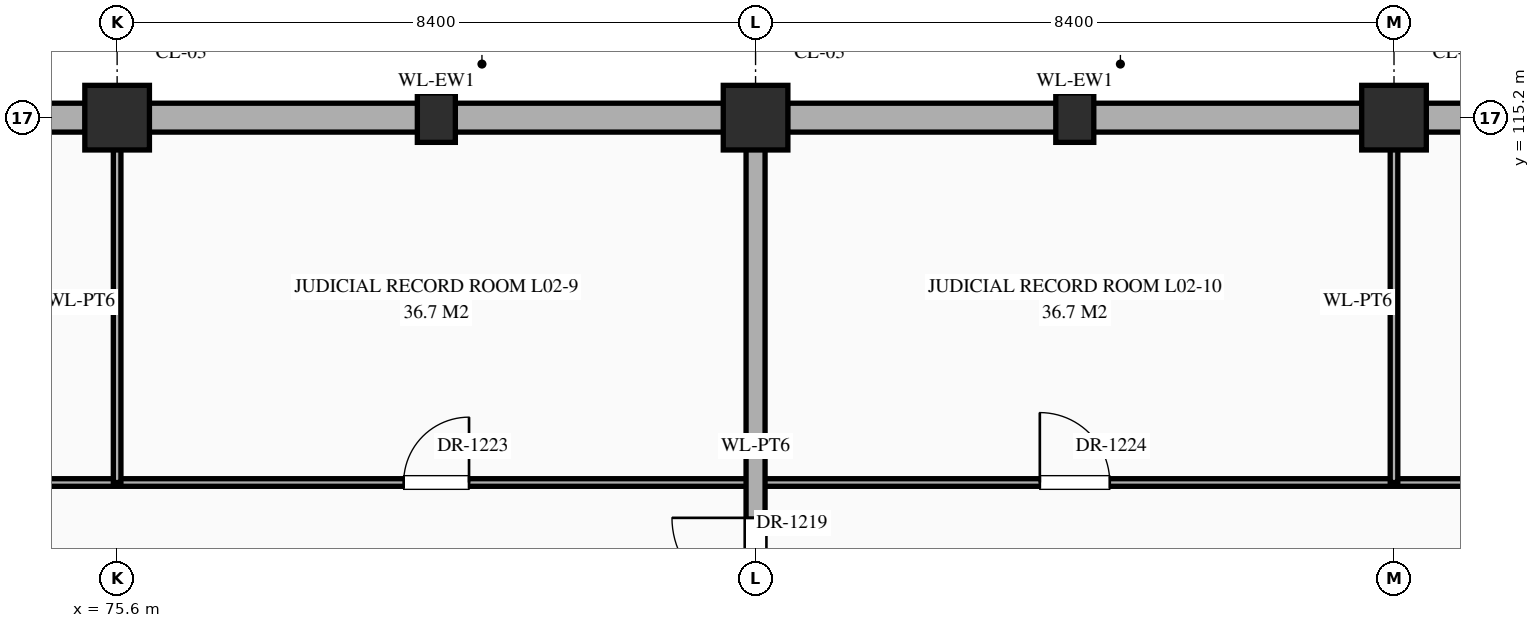
"""IFC4 building model, lengths in metres.
Left out: names, types, materials, properties, quantities, classifications, styles, units other than length and angle.
Written with IfcOpenShell. Run it as: python <this file> out.ifc"""

import sys

from ifc_helpers import new_model, si_unit, direction, frame, frame_2d, origin, origin_2d, place, context, subcontext, project, spatial, rectangle, extrude, element, fill, save


model = new_model("IFC4")
c1 = context("Model", 3, precision=1e-05, world=origin(), true_north=direction((0.0, 1.0)))
c2 = subcontext(c1, "Body", "Model", "MODEL_VIEW")
j1 = project(units=[si_unit("LENGTHUNIT", "METRE"), si_unit("PLANEANGLEUNIT", "RADIAN")], contexts=[c1])
p1 = place(None, origin())
s1 = spatial("IfcSite", under=j1, at=p1, CompositionType="ELEMENT")
p2 = place(p1, origin())
s2 = spatial("IfcBuilding", under=s1, at=p2, CompositionType="ELEMENT")
p3 = place(p2, frame((0.0, 0.0, 5.4)))
s3 = spatial("IfcBuildingStorey", under=s2, at=p3, CompositionType="ELEMENT", Elevation=5.4)
for number, where, z_axis, x_axis in (
    (1, (75.6, 115.2, 0.0), (0.0, 0.0, 1.0), (1.0, 0.0, 0.0)),
    (2, (84.0, 115.2, 0.0), (0.0, 0.0, 1.0), (1.0, 0.0, 0.0)),
    (3, (92.4, 115.2, 0.0), (0.0, 0.0, 1.0), (1.0, 0.0, 0.0)),
):
    element("IfcColumn", number, at=place(p3, frame(where, z_axis=z_axis, x_axis=x_axis)), inside=s3, PredefinedType="COLUMN", context=c2, shape_type="SweptSolid", body=[
        extrude(rectangle(XDim=0.85, YDim=0.85, at=origin_2d()), origin(), (0.0, 0.0, 1.0), 5.4),
    ])
for number, where, z_axis, x_axis in (
    (4, (79.8, 115.2, 0.0), (0.0, 0.0, 1.0), (1.0, 0.0, 0.0)),
    (5, (88.2, 115.2, 0.0), (0.0, 0.0, 1.0), (1.0, 0.0, 0.0)),
):
    element("IfcColumn", number, at=place(p3, frame(where, z_axis=z_axis, x_axis=x_axis)), inside=s3, PredefinedType="PILASTER", context=c2, shape_type="SweptSolid", body=[
        extrude(rectangle(XDim=0.5, YDim=0.65, at=origin_2d()), origin(), (0.0, 0.0, 1.0), 5.4),
    ])
p4 = place(p3, frame((67.62, 115.2, 0.0), z_axis=(0.0, 0.0, 1.0), x_axis=(1.0, 0.0, 0.0)))
e6 = element("IfcWall", 6, at=p4, inside=s3, PredefinedType="STANDARD", context=c2, shape_type="SweptSolid", body=[
    extrude(rectangle(XDim=7.56, YDim=0.38, at=frame_2d((3.78, 0.0))), origin(), (0.0, 0.0, 1.0), 4.47),
])
for number, where, z_axis, x_axis in (
    (7, (76.02, 115.2, 0.0), (0.0, 0.0, 1.0), (1.0, 0.0, 0.0)),
    (8, (84.42, 115.2, 0.0), (0.0, 0.0, 1.0), (1.0, 0.0, 0.0)),
):
    element("IfcWall", number, at=place(p3, frame(where, z_axis=z_axis, x_axis=x_axis)), inside=s3, PredefinedType="STANDARD", context=c2, shape_type="SweptSolid", body=[
        extrude(rectangle(XDim=7.56, YDim=0.38, at=frame_2d((3.78, 0.0))), origin(), (0.0, 0.0, 1.0), 4.47),
    ])
p5 = place(p3, frame((92.82, 115.2, 0.0), z_axis=(0.0, 0.0, 1.0), x_axis=(1.0, 0.0, 0.0)))
e9 = element("IfcWall", 9, at=p5, inside=s3, PredefinedType="STANDARD", context=c2, shape_type="SweptSolid", body=[
    extrude(rectangle(XDim=7.56, YDim=0.38, at=frame_2d((3.78, 0.0))), origin(), (0.0, 0.0, 1.0), 4.47),
])
p6 = place(p3, frame((50.44, 110.4, 0.0), z_axis=(0.0, 0.0, 1.0), x_axis=(1.0, 0.0, 0.0)))
e10 = element("IfcWall", 10, at=p6, inside=s3, PredefinedType="STANDARD", context=c2, shape_type="SweptSolid", body=[
    extrude(rectangle(XDim=67.12, YDim=0.1, at=frame_2d((33.56, 0.0))), origin(), (0.0, 0.0, 1.0), 5.12),
])
p7 = place(p6, frame((3.65, 0.0, 0.0)))
e11 = element("IfcOpeningElement", 11, at=p7, cuts=e10, PredefinedType="OPENING", context=c2, shape_type="SweptSolid", body=[
    extrude(rectangle(XDim=1.06, YDim=2.4, at=frame_2d((0.53, 1.2))), frame((0.0, 0.062, 0.0), z_axis=(0.0, -1.0, 0.0), x_axis=(1.0, 0.0, 0.0)), (0.0, 0.0, 1.0), 0.124),
])
p8 = place(p6, frame((11.99, 0.0, 0.0)))
e12 = element("IfcOpeningElement", 12, at=p8, cuts=e10, PredefinedType="OPENING", context=c2, shape_type="SweptSolid", body=[
    extrude(rectangle(XDim=1.14, YDim=2.4, at=frame_2d((0.57, 1.2))), frame((0.0, 0.062, 0.0), z_axis=(0.0, -1.0, 0.0), x_axis=(1.0, 0.0, 0.0)), (0.0, 0.0, 1.0), 0.124),
])
p9 = place(p6, frame((20.51, 0.0, 0.0)))
e13 = element("IfcOpeningElement", 13, at=p9, cuts=e10, PredefinedType="OPENING", context=c2, shape_type="SweptSolid", body=[
    extrude(rectangle(XDim=0.9, YDim=2.15, at=frame_2d((0.45, 1.075))), frame((0.0, 0.062, 0.0), z_axis=(0.0, -1.0, 0.0), x_axis=(1.0, 0.0, 0.0)), (0.0, 0.0, 1.0), 0.124),
])
p10 = place(p6, frame((28.93, 0.0, 0.0)))
e14 = element("IfcOpeningElement", 14, at=p10, cuts=e10, PredefinedType="OPENING", context=c2, shape_type="SweptSolid", body=[
    extrude(rectangle(XDim=0.86, YDim=2.1, at=frame_2d((0.43, 1.05))), frame((0.0, 0.062, 0.0), z_axis=(0.0, -1.0, 0.0), x_axis=(1.0, 0.0, 0.0)), (0.0, 0.0, 1.0), 0.124),
])
p11 = place(p6, frame((37.3, 0.0, 0.0)))
e15 = element("IfcOpeningElement", 15, at=p11, cuts=e10, PredefinedType="OPENING", context=c2, shape_type="SweptSolid", body=[
    extrude(rectangle(XDim=0.92, YDim=2.15, at=frame_2d((0.46, 1.075))), frame((0.0, 0.062, 0.0), z_axis=(0.0, -1.0, 0.0), x_axis=(1.0, 0.0, 0.0)), (0.0, 0.0, 1.0), 0.124),
])
p12 = place(p6, frame((45.68, 0.0, 0.0)))
e16 = element("IfcOpeningElement", 16, at=p12, cuts=e10, PredefinedType="OPENING", context=c2, shape_type="SweptSolid", body=[
    extrude(rectangle(XDim=0.96, YDim=2.2, at=frame_2d((0.48, 1.1))), frame((0.0, 0.062, 0.0), z_axis=(0.0, -1.0, 0.0), x_axis=(1.0, 0.0, 0.0)), (0.0, 0.0, 1.0), 0.124),
])
p13 = place(p6, frame((54.06, 0.0, 0.0)))
e17 = element("IfcOpeningElement", 17, at=p13, cuts=e10, PredefinedType="OPENING", context=c2, shape_type="SweptSolid", body=[
    extrude(rectangle(XDim=1.0, YDim=2.25, at=frame_2d((0.5, 1.125))), frame((0.0, 0.062, 0.0), z_axis=(0.0, -1.0, 0.0), x_axis=(1.0, 0.0, 0.0)), (0.0, 0.0, 1.0), 0.124),
])
p14 = place(p6, frame((62.42, 0.0, 0.0)))
e18 = element("IfcOpeningElement", 18, at=p14, cuts=e10, PredefinedType="OPENING", context=c2, shape_type="SweptSolid", body=[
    extrude(rectangle(XDim=1.04, YDim=2.2, at=frame_2d((0.52, 1.1))), frame((0.0, 0.062, 0.0), z_axis=(0.0, -1.0, 0.0), x_axis=(1.0, 0.0, 0.0)), (0.0, 0.0, 1.0), 0.124),
])
p15 = place(p3, frame((75.6, 110.4, 0.0), z_axis=(0.0, 0.0, 1.0), x_axis=(0.0, 1.0, 0.0)))
e19 = element("IfcWall", 19, at=p15, inside=s3, PredefinedType="STANDARD", context=c2, shape_type="SweptSolid", body=[
    extrude(rectangle(XDim=4.76, YDim=0.1, at=frame_2d((2.38, 0.0))), origin(), (0.0, 0.0, 1.0), 4.37),
])
p16 = place(p3, frame((84.0, 100.8, 0.0), z_axis=(0.0, 0.0, 1.0), x_axis=(0.0, 1.0, 0.0)))
e20 = element("IfcWall", 20, at=p16, inside=s3, PredefinedType="STANDARD", context=c2, shape_type="SweptSolid", body=[
    extrude(rectangle(XDim=14.36, YDim=0.25, at=frame_2d((7.18, 0.0))), origin(), (0.0, 0.0, 1.0), 4.37),
])
p17 = place(p16, frame((0.985, 0.0, 0.0)))
e21 = element("IfcOpeningElement", 21, at=p17, cuts=e20, PredefinedType="OPENING", context=c2, shape_type="SweptSolid", body=[
    extrude(rectangle(XDim=2.0, YDim=2.4, at=frame_2d((1.0, 1.2))), frame((0.0, 0.137, 0.0), z_axis=(0.0, -1.0, 0.0), x_axis=(1.0, 0.0, 0.0)), (0.0, 0.0, 1.0), 0.274),
])
p18 = place(p16, frame((4.465, 0.0, 0.0)))
e22 = element("IfcOpeningElement", 22, at=p18, cuts=e20, PredefinedType="OPENING", context=c2, shape_type="SweptSolid", body=[
    extrude(rectangle(XDim=1.5, YDim=2.25, at=frame_2d((0.75, 1.125))), frame((0.0, 0.137, 0.0), z_axis=(0.0, -1.0, 0.0), x_axis=(1.0, 0.0, 0.0)), (0.0, 0.0, 1.0), 0.274),
])
p19 = place(p16, frame((8.035, 0.0, 0.0)))
e23 = element("IfcOpeningElement", 23, at=p19, cuts=e20, PredefinedType="OPENING", context=c2, shape_type="SweptSolid", body=[
    extrude(rectangle(XDim=1.1, YDim=2.2, at=frame_2d((0.55, 1.1))), frame((0.0, 0.137, 0.0), z_axis=(0.0, -1.0, 0.0), x_axis=(1.0, 0.0, 0.0)), (0.0, 0.0, 1.0), 0.274),
])
p20 = place(p3, frame((92.4, 110.4, 0.0), z_axis=(0.0, 0.0, 1.0), x_axis=(0.0, 1.0, 0.0)))
e24 = element("IfcWall", 24, at=p20, inside=s3, PredefinedType="STANDARD", context=c2, shape_type="SweptSolid", body=[
    extrude(rectangle(XDim=4.76, YDim=0.1, at=frame_2d((2.38, 0.0))), origin(), (0.0, 0.0, 1.0), 4.37),
])
p21 = place(p19, origin())
e25 = element("IfcDoor", 25, at=p21, inside=s3, OperationType="SINGLE_SWING_RIGHT", PredefinedType="DOOR", context=c2, shape_type="SweptSolid", body=[
    extrude(rectangle(XDim=1.1, YDim=2.2, at=frame_2d((0.55, 1.1))), frame((0.0, 0.025, 0.0), z_axis=(0.0, -1.0, 0.0), x_axis=(1.0, 0.0, 0.0)), (0.0, 0.0, 1.0), 0.05),
])
fill(e23, e25)
p22 = place(p10, origin())
e26 = element("IfcDoor", 26, at=p22, inside=s3, OperationType="SINGLE_SWING_RIGHT", PredefinedType="DOOR", context=c2, shape_type="SweptSolid", body=[
    extrude(rectangle(XDim=0.86, YDim=2.1, at=frame_2d((0.43, 1.05))), frame((0.0, 0.025, 0.0), z_axis=(0.0, -1.0, 0.0), x_axis=(1.0, 0.0, 0.0)), (0.0, 0.0, 1.0), 0.05),
])
fill(e14, e26)
p23 = place(p11, origin())
e27 = element("IfcDoor", 27, at=p23, inside=s3, OperationType="SINGLE_SWING_LEFT", PredefinedType="DOOR", context=c2, shape_type="SweptSolid", body=[
    extrude(rectangle(XDim=0.92, YDim=2.15, at=frame_2d((0.46, 1.075))), frame((0.0, 0.025, 0.0), z_axis=(0.0, -1.0, 0.0), x_axis=(1.0, 0.0, 0.0)), (0.0, 0.0, 1.0), 0.05),
])
fill(e15, e27)
save(model, sys.argv[1])
